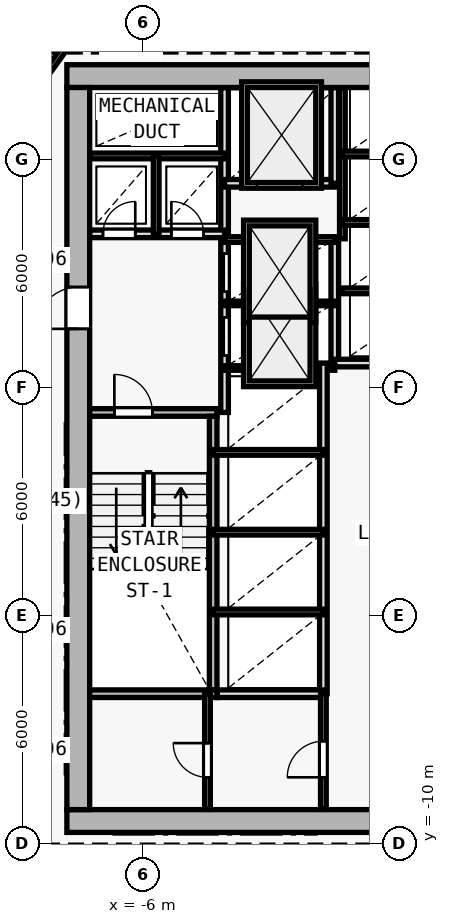
"""IFC4 building model, lengths in metres.
Left out: names, types, materials, properties, quantities, classifications, styles, units other than length and angle.
Written with IfcOpenShell. Run it as: python <this file> out.ifc"""

import sys

from ifc_helpers import new_model, si_unit, direction, frame, frame_2d, origin, origin_2d, place, context, subcontext, project, spatial, rectangle, i_section, extrude, element, fill, save


model = new_model("IFC4")
c1 = context("Model", 3, precision=1e-05, world=origin(), true_north=direction((0.0, 1.0)))
c2 = subcontext(c1, "Body", "Model", "MODEL_VIEW")
j1 = project(units=[si_unit("LENGTHUNIT", "METRE"), si_unit("PLANEANGLEUNIT", "RADIAN")], contexts=[c1])
p1 = place(None, origin())
s1 = spatial("IfcSite", under=j1, at=p1, CompositionType="ELEMENT")
p2 = place(p1, origin())
s2 = spatial("IfcBuilding", under=s1, at=p2, CompositionType="ELEMENT")
p3 = place(p2, frame((0.0, 0.0, 58.8)))
s3 = spatial("IfcBuildingStorey", under=s2, at=p3, CompositionType="ELEMENT", Elevation=58.8)
for number, where, z_axis, x_axis in (
    (1, (-7.7, -9.4, 0.0), (0.0, 0.0, 1.0), (1.0, 0.0, 0.0)),
    (2, (-7.7, 10.2, 0.0), (0.0, 0.0, 1.0), (1.0, 0.0, 0.0)),
    (3, (0.0, -9.4, 0.0), (0.0, 0.0, 1.0), (1.0, 0.0, 0.0)),
    (4, (-7.7, 2.0, 0.0), (0.0, 0.0, 1.0), (1.0, 0.0, 0.0)),
):
    element("IfcColumn", number, at=place(p3, frame(where, z_axis=z_axis, x_axis=x_axis)), inside=s3, PredefinedType="COLUMN", context=c2, shape_type="SweptSolid", body=[
        extrude(i_section(OverallWidth=0.416, OverallDepth=0.446, WebThickness=0.025, FlangeThickness=0.04, FilletRadius=0.015, at=origin_2d()), origin(), (0.0, 0.0, 1.0), 3.6),
    ])
p4 = place(p3, frame((-8.0, -9.4, 0.0), z_axis=(0.0, 0.0, 1.0), x_axis=(1.0, 0.0, 0.0)))
e5 = element("IfcWall", 5, at=p4, inside=s3, PredefinedType="SHEAR", context=c2, shape_type="SweptSolid", body=[
    extrude(rectangle(XDim=16.0, YDim=0.6, at=frame_2d((8.0, 0.0))), origin(), (0.0, 0.0, 1.0), 3.35),
])
p5 = place(p4, frame((9.65, 0.0, 0.0)))
e6 = element("IfcOpeningElement", 6, at=p5, cuts=e5, PredefinedType="OPENING", context=c2, shape_type="SweptSolid", body=[
    extrude(rectangle(XDim=1.5, YDim=2.2, at=frame_2d((0.75, 1.1))), frame((0.0, 0.31, 0.0), z_axis=(0.0, -1.0, 0.0), x_axis=(1.0, 0.0, 0.0)), (0.0, 0.0, 1.0), 0.62),
])
p6 = place(p3, frame((8.0, 10.2, 0.0), z_axis=(0.0, 0.0, 1.0), x_axis=(-1.0, 0.0, 0.0)))
e7 = element("IfcWall", 7, at=p6, inside=s3, PredefinedType="SHEAR", context=c2, shape_type="SweptSolid", body=[
    extrude(rectangle(XDim=16.0, YDim=0.6, at=frame_2d((8.0, 0.0))), origin(), (0.0, 0.0, 1.0), 3.35),
])
p7 = place(p6, frame((4.45, 0.0, 0.0)))
e8 = element("IfcOpeningElement", 8, at=p7, cuts=e7, PredefinedType="OPENING", context=c2, shape_type="SweptSolid", body=[
    extrude(rectangle(XDim=1.1, YDim=2.15, at=frame_2d((0.55, 1.075))), frame((0.0, 0.31, 0.0), z_axis=(0.0, -1.0, 0.0), x_axis=(1.0, 0.0, 0.0)), (0.0, 0.0, 1.0), 0.62),
])
p8 = place(p3, frame((-7.7, -9.1, 0.0), z_axis=(0.0, 0.0, 1.0), x_axis=(0.0, 1.0, 0.0)))
e9 = element("IfcWall", 9, at=p8, inside=s3, PredefinedType="SHEAR", context=c2, shape_type="SweptSolid", body=[
    extrude(rectangle(XDim=19.0, YDim=0.6, at=frame_2d((9.5, 0.0))), origin(), (0.0, 0.0, 1.0), 3.35),
])
p9 = place(p8, frame((12.65, 0.0, 0.0)))
e10 = element("IfcOpeningElement", 10, at=p9, cuts=e9, PredefinedType="OPENING", context=c2, shape_type="SweptSolid", body=[
    extrude(rectangle(XDim=1.1, YDim=2.15, at=frame_2d((0.55, 1.075))), frame((0.0, 0.31, 0.0), z_axis=(0.0, -1.0, 0.0), x_axis=(1.0, 0.0, 0.0)), (0.0, 0.0, 1.0), 0.62),
])
p10 = place(p3, frame((-7.4, 1.35, 0.0), z_axis=(0.0, 0.0, 1.0), x_axis=(1.0, 0.0, 0.0)))
e11 = element("IfcWall", 11, at=p10, inside=s3, PredefinedType="SOLIDWALL", context=c2, shape_type="SweptSolid", body=[
    extrude(rectangle(XDim=3.35, YDim=0.2, at=frame_2d((1.675, 0.0))), origin(), (0.0, 0.0, 1.0), 3.35),
])
p11 = place(p10, frame((0.65, 0.0, 0.0)))
e12 = element("IfcOpeningElement", 12, at=p11, cuts=e11, PredefinedType="OPENING", context=c2, shape_type="SweptSolid", body=[
    extrude(rectangle(XDim=1.0, YDim=2.15, at=frame_2d((0.5, 1.075))), frame((0.0, 0.11, 0.0), z_axis=(0.0, -1.0, 0.0), x_axis=(1.0, 0.0, 0.0)), (0.0, 0.0, 1.0), 0.22),
])
p12 = place(p3, frame((-4.15, -5.95, 0.0), z_axis=(0.0, 0.0, 1.0), x_axis=(0.0, 1.0, 0.0)))
e13 = element("IfcWall", 13, at=p12, inside=s3, PredefinedType="SOLIDWALL", context=c2, shape_type="SweptSolid", body=[
    extrude(rectangle(XDim=7.2, YDim=0.2, at=frame_2d((3.6, 0.0))), origin(), (0.0, 0.0, 1.0), 3.35),
])
p13 = place(p3, frame((-3.85, 1.35, 0.0), z_axis=(0.0, 0.0, 1.0), x_axis=(0.0, 1.0, 0.0)))
e14 = element("IfcWall", 14, at=p13, inside=s3, PredefinedType="SOLIDWALL", context=c2, shape_type="SweptSolid", body=[
    extrude(rectangle(XDim=8.545, YDim=0.2, at=frame_2d((4.272, 0.0))), origin(), (0.0, 0.0, 1.0), 3.35),
])
p14 = place(p13, frame((1.5, 0.0, 0.0)))
e15 = element("IfcOpeningElement", 15, at=p14, cuts=e14, PredefinedType="OPENING", context=c2, shape_type="SweptSolid", body=[
    extrude(rectangle(XDim=1.0, YDim=2.15, at=frame_2d((0.5, 1.075))), frame((0.0, 0.11, 0.0), z_axis=(0.0, -1.0, 0.0), x_axis=(1.0, 0.0, 0.0)), (0.0, 0.0, 1.0), 0.22),
])
p15 = place(p13, frame((3.18, 0.0, 0.0)))
e16 = element("IfcOpeningElement", 16, at=p15, cuts=e14, PredefinedType="OPENING", context=c2, shape_type="SweptSolid", body=[
    extrude(rectangle(XDim=1.0, YDim=2.15, at=frame_2d((0.5, 1.075))), frame((0.0, 0.11, 0.0), z_axis=(0.0, -1.0, 0.0), x_axis=(1.0, 0.0, 0.0)), (0.0, 0.0, 1.0), 0.22),
])
p16 = place(p3, frame((-7.395, 6.05, 0.0), z_axis=(0.0, 0.0, 1.0), x_axis=(1.0, 0.0, 0.0)))
e17 = element("IfcWall", 17, at=p16, inside=s3, PredefinedType="SOLIDWALL", context=c2, shape_type="SweptSolid", body=[
    extrude(rectangle(XDim=3.545, YDim=0.2, at=frame_2d((1.772, 0.0))), origin(), (0.0, 0.0, 1.0), 3.35),
])
p17 = place(p16, frame((0.345, 0.0, 0.0)))
e18 = element("IfcOpeningElement", 18, at=p17, cuts=e17, PredefinedType="OPENING", context=c2, shape_type="SweptSolid", body=[
    extrude(rectangle(XDim=0.85, YDim=2.1, at=frame_2d((0.425, 1.05))), frame((0.0, 0.11, 0.0), z_axis=(0.0, -1.0, 0.0), x_axis=(1.0, 0.0, 0.0)), (0.0, 0.0, 1.0), 0.22),
])
p18 = place(p16, frame((2.145, 0.0, 0.0)))
e19 = element("IfcOpeningElement", 19, at=p18, cuts=e17, PredefinedType="OPENING", context=c2, shape_type="SweptSolid", body=[
    extrude(rectangle(XDim=0.85, YDim=2.1, at=frame_2d((0.425, 1.05))), frame((0.0, 0.11, 0.0), z_axis=(0.0, -1.0, 0.0), x_axis=(1.0, 0.0, 0.0)), (0.0, 0.0, 1.0), 0.22),
])
p19 = place(p3, frame((-7.395, 8.1, 0.0), z_axis=(0.0, 0.0, 1.0), x_axis=(1.0, 0.0, 0.0)))
e20 = element("IfcWall", 20, at=p19, inside=s3, PredefinedType="PARTITIONING", context=c2, shape_type="SweptSolid", body=[
    extrude(rectangle(XDim=3.545, YDim=0.15, at=frame_2d((1.772, 0.0))), origin(), (0.0, 0.0, 1.0), 3.35),
])
p20 = place(p3, frame((-5.65, 6.05, 0.0), z_axis=(0.0, 0.0, 1.0), x_axis=(0.0, 1.0, 0.0)))
e21 = element("IfcWall", 21, at=p20, inside=s3, PredefinedType="PARTITIONING", context=c2, shape_type="SweptSolid", body=[
    extrude(rectangle(XDim=2.05, YDim=0.15, at=frame_2d((1.025, 0.0))), origin(), (0.0, 0.0, 1.0), 3.35),
])
p21 = place(p3, frame((-0.95, 2.65, 0.0), z_axis=(0.0, 0.0, 1.0), x_axis=(0.0, 1.0, 0.0)))
e22 = element("IfcWall", 22, at=p21, inside=s3, PredefinedType="SOLIDWALL", context=c2, shape_type="SweptSolid", body=[
    extrude(rectangle(XDim=3.27, YDim=0.2, at=frame_2d((1.635, 0.0))), origin(), (0.0, 0.0, 1.0), 3.35),
])
for number, where, z_axis, x_axis in (
    (23, (-3.85, 2.52, 0.0), (0.0, 0.0, 1.0), (1.0, 0.0, 0.0)),
    (24, (-3.85, 4.22, 0.0), (0.0, 0.0, 1.0), (1.0, 0.0, 0.0)),
):
    element("IfcWall", number, at=place(p3, frame(where, z_axis=z_axis, x_axis=x_axis)), inside=s3, PredefinedType="PARTITIONING", context=c2, shape_type="SweptSolid", body=[
        extrude(rectangle(XDim=2.9, YDim=0.12, at=frame_2d((1.45, 0.0))), origin(), (0.0, 0.0, 1.0), 3.35),
    ])
p22 = place(p3, frame((-3.85, 5.9, 0.0), z_axis=(0.0, 0.0, 1.0), x_axis=(1.0, 0.0, 0.0)))
e25 = element("IfcWall", 25, at=p22, inside=s3, PredefinedType="PARTITIONING", context=c2, shape_type="SweptSolid", body=[
    extrude(rectangle(XDim=2.9, YDim=0.15, at=frame_2d((1.45, 0.0))), origin(), (0.0, 0.0, 1.0), 3.35),
])
p23 = place(p3, frame((-3.85, 7.38, 0.0), z_axis=(0.0, 0.0, 1.0), x_axis=(1.0, 0.0, 0.0)))
e26 = element("IfcWall", 26, at=p23, inside=s3, PredefinedType="SOLIDWALL", context=c2, shape_type="SweptSolid", body=[
    extrude(rectangle(XDim=2.9, YDim=0.2, at=frame_2d((1.45, 0.0))), origin(), (0.0, 0.0, 1.0), 3.35),
])
p24 = place(p23, frame((0.85, 0.0, 0.0)))
e27 = element("IfcOpeningElement", 27, at=p24, cuts=e26, PredefinedType="OPENING", context=c2, shape_type="SweptSolid", body=[
    extrude(rectangle(XDim=1.2, YDim=2.2, at=frame_2d((0.6, 1.1))), frame((0.0, 0.11, 0.0), z_axis=(0.0, -1.0, 0.0), x_axis=(1.0, 0.0, 0.0)), (0.0, 0.0, 1.0), 0.22),
])
p25 = place(p3, frame((-0.95, 7.38, 0.0), z_axis=(0.0, 0.0, 1.0), x_axis=(0.0, 1.0, 0.0)))
e28 = element("IfcWall", 28, at=p25, inside=s3, PredefinedType="SOLIDWALL", context=c2, shape_type="SweptSolid", body=[
    extrude(rectangle(XDim=2.515, YDim=0.2, at=frame_2d((1.258, 0.0))), origin(), (0.0, 0.0, 1.0), 3.35),
])
p26 = place(p3, frame((-1.25, -6.05, 0.0), z_axis=(0.0, 0.0, 1.0), x_axis=(0.0, 1.0, 0.0)))
e29 = element("IfcWall", 29, at=p26, inside=s3, PredefinedType="SOLIDWALL", context=c2, shape_type="SweptSolid", body=[
    extrude(rectangle(XDim=8.7, YDim=0.2, at=frame_2d((4.35, 0.0))), origin(), (0.0, 0.0, 1.0), 3.35),
])
for number, where, z_axis, x_axis in (
    (30, (-4.15, -3.9, 0.0), (0.0, 0.0, 1.0), (1.0, 0.0, 0.0)),
    (31, (-4.15, -1.8, 0.0), (0.0, 0.0, 1.0), (1.0, 0.0, 0.0)),
    (32, (-4.15, 0.3, 0.0), (0.0, 0.0, 1.0), (1.0, 0.0, 0.0)),
):
    element("IfcWall", number, at=place(p3, frame(where, z_axis=z_axis, x_axis=x_axis)), inside=s3, PredefinedType="PARTITIONING", context=c2, shape_type="SweptSolid", body=[
        extrude(rectangle(XDim=2.9, YDim=0.15, at=frame_2d((1.45, 0.0))), origin(), (0.0, 0.0, 1.0), 3.35),
    ])
p27 = place(p3, frame((-0.95, 2.65, 0.0), z_axis=(0.0, 0.0, 1.0), x_axis=(1.0, 0.0, 0.0)))
e33 = element("IfcWall", 33, at=p27, inside=s3, PredefinedType="SOLIDWALL", context=c2, shape_type="SweptSolid", body=[
    extrude(rectangle(XDim=2.9, YDim=0.2, at=frame_2d((1.45, 0.0))), origin(), (0.0, 0.0, 1.0), 3.35),
])
p28 = place(p3, frame((-0.75, 5.92, 0.0), z_axis=(0.0, 0.0, 1.0), x_axis=(0.0, 1.0, 0.0)))
e34 = element("IfcWall", 34, at=p28, inside=s3, PredefinedType="PARTITIONING", context=c2, shape_type="SweptSolid", body=[
    extrude(rectangle(XDim=3.975, YDim=0.15, at=frame_2d((1.988, 0.0))), origin(), (0.0, 0.0, 1.0), 3.35),
])
for number, where, z_axis, x_axis in (
    (35, (-0.75, 4.55, 0.0), (0.0, 0.0, 1.0), (1.0, 0.0, 0.0)),
    (36, (-0.75, 6.35, 0.0), (0.0, 0.0, 1.0), (1.0, 0.0, 0.0)),
    (37, (-0.75, 8.15, 0.0), (0.0, 0.0, 1.0), (1.0, 0.0, 0.0)),
):
    element("IfcWall", number, at=place(p3, frame(where, z_axis=z_axis, x_axis=x_axis)), inside=s3, PredefinedType="PARTITIONING", context=c2, shape_type="SweptSolid", body=[
        extrude(rectangle(XDim=2.7, YDim=0.15, at=frame_2d((1.35, 0.0))), origin(), (0.0, 0.0, 1.0), 3.35),
    ])
p29 = place(p3, frame((-7.4, -6.05, 0.0), z_axis=(0.0, 0.0, 1.0), x_axis=(1.0, 0.0, 0.0)))
e38 = element("IfcWall", 38, at=p29, inside=s3, PredefinedType="SOLIDWALL", context=c2, shape_type="SweptSolid", body=[
    extrude(rectangle(XDim=3.35, YDim=0.2, at=frame_2d((1.675, 0.0))), origin(), (0.0, 0.0, 1.0), 3.35),
])
p30 = place(p3, frame((-4.04, -6.05, 0.0), z_axis=(0.0, 0.0, 1.0), x_axis=(1.0, 0.0, 0.0)))
e39 = element("IfcWall", 39, at=p30, inside=s3, PredefinedType="SOLIDWALL", context=c2, shape_type="SweptSolid", body=[
    extrude(rectangle(XDim=2.79, YDim=0.2, at=frame_2d((1.395, 0.0))), origin(), (0.0, 0.0, 1.0), 3.35),
])
p31 = place(p3, frame((-1.25, -9.095, 0.0), z_axis=(0.0, 0.0, 1.0), x_axis=(0.0, 1.0, 0.0)))
e40 = element("IfcWall", 40, at=p31, inside=s3, PredefinedType="PARTITIONING", context=c2, shape_type="SweptSolid", body=[
    extrude(rectangle(XDim=3.045, YDim=0.15, at=frame_2d((1.522, 0.0))), origin(), (0.0, 0.0, 1.0), 3.35),
])
p32 = place(p31, frame((0.845, 0.0, 0.0)))
e41 = element("IfcOpeningElement", 41, at=p32, cuts=e40, PredefinedType="OPENING", context=c2, shape_type="SweptSolid", body=[
    extrude(rectangle(XDim=0.95, YDim=2.1, at=frame_2d((0.475, 1.05))), frame((0.0, 0.085, 0.0), z_axis=(0.0, -1.0, 0.0), x_axis=(1.0, 0.0, 0.0)), (0.0, 0.0, 1.0), 0.17),
])
p33 = place(p3, frame((-4.3, -9.095, 0.0), z_axis=(0.0, 0.0, 1.0), x_axis=(0.0, 1.0, 0.0)))
e42 = element("IfcWall", 42, at=p33, inside=s3, PredefinedType="PARTITIONING", context=c2, shape_type="SweptSolid", body=[
    extrude(rectangle(XDim=3.045, YDim=0.15, at=frame_2d((1.522, 0.0))), origin(), (0.0, 0.0, 1.0), 3.35),
])
p34 = place(p33, frame((0.845, 0.0, 0.0)))
e43 = element("IfcOpeningElement", 43, at=p34, cuts=e42, PredefinedType="OPENING", context=c2, shape_type="SweptSolid", body=[
    extrude(rectangle(XDim=0.9, YDim=2.1, at=frame_2d((0.45, 1.05))), frame((0.0, 0.085, 0.0), z_axis=(0.0, -1.0, 0.0), x_axis=(1.0, 0.0, 0.0)), (0.0, 0.0, 1.0), 0.17),
])
p35 = place(p3, frame((-9.86, 8.426, 0.0), z_axis=(0.0, 0.0, 1.0), x_axis=(0.582449511476, 0.812866881218, 0.0)))
e44 = element("IfcWall", 44, at=p35, inside=s3, PredefinedType="PARTITIONING", context=c2, shape_type="SweptSolid", body=[
    extrude(rectangle(XDim=4.84, YDim=0.15, at=frame_2d((2.42, 0.0))), origin(), (0.0, 0.0, 1.0), 2.725),
])
p36 = place(p35, frame((3.074, 0.0, 0.0)))
e45 = element("IfcOpeningElement", 45, at=p36, cuts=e44, PredefinedType="OPENING", context=c2, shape_type="SweptSolid", body=[
    extrude(rectangle(XDim=0.9, YDim=2.1, at=frame_2d((0.45, 1.05))), frame((0.0, 0.085, 0.0), z_axis=(0.0, -1.0, 0.0), x_axis=(1.0, 0.0, 0.0)), (0.0, 0.0, 1.0), 0.17),
])
p37 = place(p9, origin())
e46 = element("IfcDoor", 46, at=p37, inside=s3, OperationType="SINGLE_SWING_LEFT", PredefinedType="DOOR", context=c2, shape_type="SweptSolid", body=[
    extrude(rectangle(XDim=1.1, YDim=2.15, at=frame_2d((0.55, 1.075))), frame((0.0, 0.025, 0.0), z_axis=(0.0, -1.0, 0.0), x_axis=(1.0, 0.0, 0.0)), (0.0, 0.0, 1.0), 0.05),
])
fill(e10, e46)
p38 = place(p11, origin())
e47 = element("IfcDoor", 47, at=p38, inside=s3, OperationType="SINGLE_SWING_LEFT", PredefinedType="DOOR", context=c2, shape_type="SweptSolid", body=[
    extrude(rectangle(XDim=1.0, YDim=2.15, at=frame_2d((0.5, 1.075))), frame((0.0, 0.025, 0.0), z_axis=(0.0, -1.0, 0.0), x_axis=(1.0, 0.0, 0.0)), (0.0, 0.0, 1.0), 0.05),
])
fill(e12, e47)
p39 = place(p17, origin())
e48 = element("IfcDoor", 48, at=p39, inside=s3, OperationType="SINGLE_SWING_RIGHT", PredefinedType="DOOR", context=c2, shape_type="SweptSolid", body=[
    extrude(rectangle(XDim=0.85, YDim=2.1, at=frame_2d((0.425, 1.05))), frame((0.0, 0.025, 0.0), z_axis=(0.0, -1.0, 0.0), x_axis=(1.0, 0.0, 0.0)), (0.0, 0.0, 1.0), 0.05),
])
fill(e18, e48)
p40 = place(p18, origin())
e49 = element("IfcDoor", 49, at=p40, inside=s3, OperationType="SINGLE_SWING_LEFT", PredefinedType="DOOR", context=c2, shape_type="SweptSolid", body=[
    extrude(rectangle(XDim=0.85, YDim=2.1, at=frame_2d((0.425, 1.05))), frame((0.0, 0.025, 0.0), z_axis=(0.0, -1.0, 0.0), x_axis=(1.0, 0.0, 0.0)), (0.0, 0.0, 1.0), 0.05),
])
fill(e19, e49)
p41 = place(p24, origin())
e50 = element("IfcDoor", 50, at=p41, inside=s3, OperationType="DOUBLE_DOOR_SLIDING", PredefinedType="DOOR", context=c2, shape_type="SweptSolid", body=[
    extrude(rectangle(XDim=1.2, YDim=2.2, at=frame_2d((0.6, 1.1))), frame((0.0, 0.025, 0.0), z_axis=(0.0, -1.0, 0.0), x_axis=(1.0, 0.0, 0.0)), (0.0, 0.0, 1.0), 0.05),
])
fill(e27, e50)
p42 = place(p14, origin())
e51 = element("IfcDoor", 51, at=p42, inside=s3, OperationType="DOUBLE_DOOR_SLIDING", PredefinedType="DOOR", context=c2, shape_type="SweptSolid", body=[
    extrude(rectangle(XDim=1.0, YDim=2.15, at=frame_2d((0.5, 1.075))), frame((0.0, 0.025, 0.0), z_axis=(0.0, -1.0, 0.0), x_axis=(1.0, 0.0, 0.0)), (0.0, 0.0, 1.0), 0.05),
])
fill(e15, e51)
p43 = place(p15, origin())
e52 = element("IfcDoor", 52, at=p43, inside=s3, OperationType="DOUBLE_DOOR_SLIDING", PredefinedType="DOOR", context=c2, shape_type="SweptSolid", body=[
    extrude(rectangle(XDim=1.0, YDim=2.15, at=frame_2d((0.5, 1.075))), frame((0.0, 0.025, 0.0), z_axis=(0.0, -1.0, 0.0), x_axis=(1.0, 0.0, 0.0)), (0.0, 0.0, 1.0), 0.05),
])
fill(e16, e52)
p44 = place(p32, origin())
e53 = element("IfcDoor", 53, at=p44, inside=s3, OperationType="SINGLE_SWING_LEFT", PredefinedType="DOOR", context=c2, shape_type="SweptSolid", body=[
    extrude(rectangle(XDim=0.95, YDim=2.1, at=frame_2d((0.475, 1.05))), frame((0.0, 0.025, 0.0), z_axis=(0.0, -1.0, 0.0), x_axis=(1.0, 0.0, 0.0)), (0.0, 0.0, 1.0), 0.05),
])
fill(e41, e53)
p45 = place(p34, origin())
e54 = element("IfcDoor", 54, at=p45, inside=s3, OperationType="SINGLE_SWING_RIGHT", PredefinedType="DOOR", context=c2, shape_type="SweptSolid", body=[
    extrude(rectangle(XDim=0.9, YDim=2.1, at=frame_2d((0.45, 1.05))), frame((0.0, 0.025, 0.0), z_axis=(0.0, -1.0, 0.0), x_axis=(1.0, 0.0, 0.0)), (0.0, 0.0, 1.0), 0.05),
])
fill(e43, e54)
save(model, sys.argv[1])
